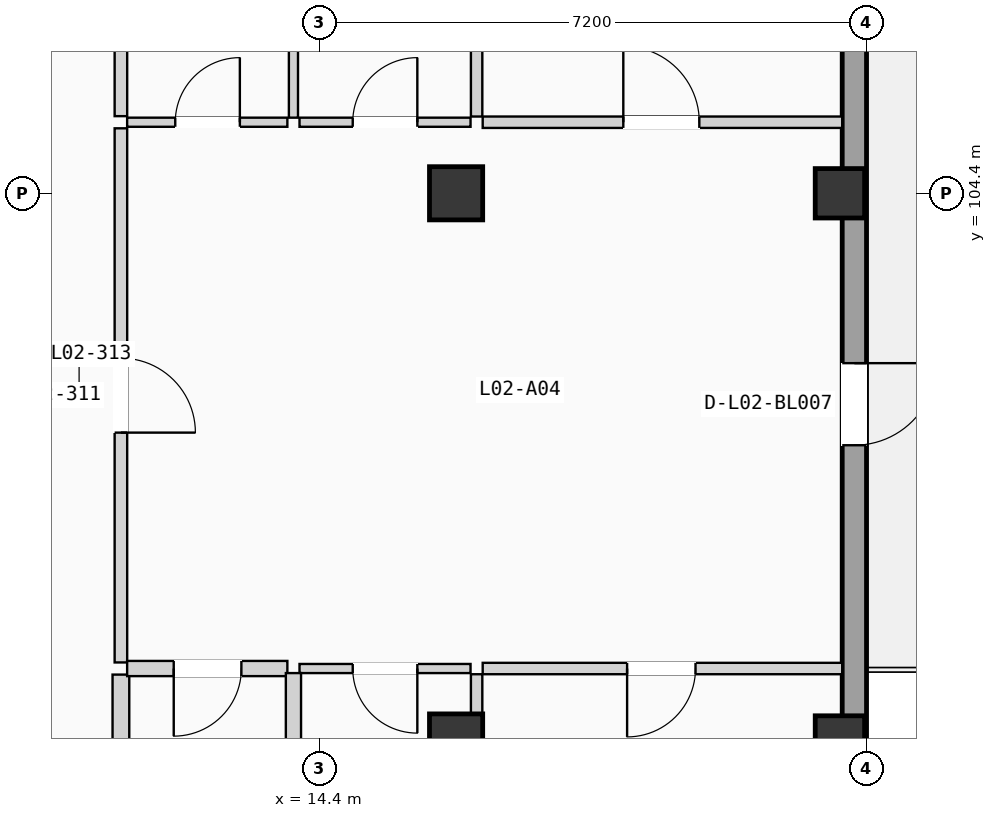
"""IFC4 building model, lengths in metres.
Left out: names, types, materials, properties, quantities, classifications, styles, units other than length and angle.
Written with IfcOpenShell. Run it as: python <this file> out.ifc"""

import sys

from ifc_helpers import new_model, si_unit, direction, frame, frame_2d, origin, origin_2d, place, context, subcontext, project, spatial, rectangle, extrude, element, fill, save


model = new_model("IFC4")
c1 = context("Model", 3, precision=1e-05, world=origin(), true_north=direction((0.0, 1.0)))
c2 = subcontext(c1, "Body", "Model", "MODEL_VIEW")
j1 = project(units=[si_unit("LENGTHUNIT", "METRE"), si_unit("PLANEANGLEUNIT", "RADIAN")], contexts=[c1])
p1 = place(None, origin())
s1 = spatial("IfcSite", under=j1, at=p1, CompositionType="ELEMENT")
p2 = place(p1, origin())
s2 = spatial("IfcBuilding", under=s1, at=p2, CompositionType="ELEMENT")
p3 = place(p2, frame((0.0, 0.0, 8.575)))
s3 = spatial("IfcBuildingStorey", under=s2, at=p3, CompositionType="ELEMENT", Elevation=8.575)
for number, where, z_axis, x_axis in (
    (1, (16.2, 97.2, 0.0), (0.0, 0.0, 1.0), (1.0, 0.0, 0.0)),
    (2, (16.2, 104.4, 0.0), (0.0, 0.0, 1.0), (1.0, 0.0, 0.0)),
):
    element("IfcColumn", number, at=place(p3, frame(where, z_axis=z_axis, x_axis=x_axis)), inside=s3, PredefinedType="COLUMN", context=c2, shape_type="SweptSolid", body=[
        extrude(rectangle(XDim=0.7, YDim=0.7, at=origin_2d()), origin(), (0.0, 0.0, 1.0), 3.5),
    ])
for number, where, z_axis, x_axis in (
    (3, (21.25, 97.2, 0.0), (0.0, 0.0, 1.0), (1.0, 0.0, 0.0)),
    (4, (21.25, 104.4, 0.0), (0.0, 0.0, 1.0), (1.0, 0.0, 0.0)),
):
    element("IfcColumn", number, at=place(p3, frame(where, z_axis=z_axis, x_axis=x_axis)), inside=s3, PredefinedType="COLUMN", context=c2, shape_type="SweptSolid", body=[
        extrude(rectangle(XDim=0.65, YDim=0.65, at=origin_2d()), origin(), (0.0, 0.0, 1.0), 3.5),
    ])
p4 = place(p3, frame((21.44, 68.72, 0.0), z_axis=(0.0, 0.0, 1.0), x_axis=(0.0, 1.0, 0.0)))
e5 = element("IfcWall", 5, at=p4, inside=s3, PredefinedType="SOLIDWALL", context=c2, shape_type="SweptSolid", body=[
    extrude(rectangle(XDim=49.76, YDim=0.32, at=frame_2d((24.88, 0.0))), origin(), (0.0, 0.0, 1.0), 3.24),
])
p5 = place(p4, frame((16.27, 0.0, 0.0)))
e6 = element("IfcOpeningElement", 6, at=p5, cuts=e5, PredefinedType="OPENING", context=c2, shape_type="SweptSolid", body=[
    extrude(rectangle(XDim=0.95, YDim=2.15, at=frame_2d((0.475, 1.075))), frame((0.0, 0.17, 0.0), z_axis=(0.0, -1.0, 0.0), x_axis=(1.0, 0.0, 0.0)), (0.0, 0.0, 1.0), 0.34),
])
p6 = place(p4, frame((8.996, 0.0, 0.9)))
e7 = element("IfcOpeningElement", 7, at=p6, cuts=e5, PredefinedType="OPENING", context=c2, shape_type="SweptSolid", body=[
    extrude(rectangle(XDim=1.48, YDim=1.2, at=frame_2d((0.74, 0.6))), frame((0.0, 0.17, 0.0), z_axis=(0.0, -1.0, 0.0), x_axis=(1.0, 0.0, 0.0)), (0.0, 0.0, 1.0), 0.34),
])
p7 = place(p4, frame((19.0, 0.0, 0.9)))
e8 = element("IfcOpeningElement", 8, at=p7, cuts=e5, PredefinedType="OPENING", context=c2, shape_type="SweptSolid", body=[
    extrude(rectangle(XDim=1.48, YDim=1.35, at=frame_2d((0.74, 0.675))), frame((0.0, 0.17, 0.0), z_axis=(0.0, -1.0, 0.0), x_axis=(1.0, 0.0, 0.0)), (0.0, 0.0, 1.0), 0.34),
])
p8 = place(p4, frame((32.365, 0.0, 0.0)))
e9 = element("IfcOpeningElement", 9, at=p8, cuts=e5, PredefinedType="OPENING", context=c2, shape_type="SweptSolid", body=[
    extrude(rectangle(XDim=1.08, YDim=2.18, at=frame_2d((0.54, 1.09))), frame((0.0, 0.17, 0.0), z_axis=(0.0, -1.0, 0.0), x_axis=(1.0, 0.0, 0.0)), (0.0, 0.0, 1.0), 0.34),
])
p9 = place(p4, frame((25.146, 0.0, 0.9)))
e10 = element("IfcOpeningElement", 10, at=p9, cuts=e5, PredefinedType="OPENING", context=c2, shape_type="SweptSolid", body=[
    extrude(rectangle(XDim=1.48, YDim=1.5, at=frame_2d((0.74, 0.75))), frame((0.0, 0.17, 0.0), z_axis=(0.0, -1.0, 0.0), x_axis=(1.0, 0.0, 0.0)), (0.0, 0.0, 1.0), 0.34),
])
p10 = place(p4, frame((38.848, 0.0, 0.9)))
e11 = element("IfcOpeningElement", 11, at=p10, cuts=e5, PredefinedType="OPENING", context=c2, shape_type="SweptSolid", body=[
    extrude(rectangle(XDim=1.48, YDim=1.65, at=frame_2d((0.74, 0.825))), frame((0.0, 0.17, 0.0), z_axis=(0.0, -1.0, 0.0), x_axis=(1.0, 0.0, 0.0)), (0.0, 0.0, 1.0), 0.34),
])
p11 = place(p3, frame((11.79, 98.227, 0.0), z_axis=(0.0, 0.0, 1.0), x_axis=(0.0, 1.0, 0.0)))
e12 = element("IfcWall", 12, at=p11, inside=s3, PredefinedType="PARTITIONING", context=c2, shape_type="SweptSolid", body=[
    extrude(rectangle(XDim=7.028, YDim=0.165, at=frame_2d((3.514, 0.0))), origin(), (0.0, 0.0, 1.0), 3.22),
])
p12 = place(p11, frame((3.024, 0.0, 0.0)))
e13 = element("IfcOpeningElement", 13, at=p12, cuts=e12, PredefinedType="OPENING", context=c2, shape_type="SweptSolid", body=[
    extrude(rectangle(XDim=0.98, YDim=2.08, at=frame_2d((0.49, 1.04))), frame((0.0, 0.093, 0.0), z_axis=(0.0, -1.0, 0.0), x_axis=(1.0, 0.0, 0.0)), (0.0, 0.0, 1.0), 0.185),
])
p13 = place(p3, frame((11.79, 92.282, 0.0), z_axis=(0.0, 0.0, 1.0), x_axis=(0.0, 1.0, 0.0)))
e14 = element("IfcWall", 14, at=p13, inside=s3, PredefinedType="PLUMBINGWALL", context=c2, shape_type="SweptSolid", body=[
    extrude(rectangle(XDim=5.785, YDim=0.22, at=frame_2d((2.893, 0.0))), origin(), (0.0, 0.0, 1.0), 3.22),
])
p14 = place(p3, frame((11.79, 105.415, 0.0), z_axis=(0.0, 0.0, 1.0), x_axis=(0.0, 1.0, 0.0)))
e15 = element("IfcWall", 15, at=p14, inside=s3, PredefinedType="PARTITIONING", context=c2, shape_type="SweptSolid", body=[
    extrude(rectangle(XDim=5.785, YDim=0.165, at=frame_2d((2.893, 0.0))), origin(), (0.0, 0.0, 1.0), 3.22),
])
p15 = place(p3, frame((11.872, 98.147, 0.0), z_axis=(0.0, 0.0, 1.0), x_axis=(1.0, 0.0, 0.0)))
e16 = element("IfcWall", 16, at=p15, inside=s3, PredefinedType="PLUMBINGWALL", context=c2, shape_type="SweptSolid", body=[
    extrude(rectangle(XDim=2.108, YDim=0.2, at=frame_2d((1.054, 0.0))), origin(), (0.0, 0.0, 1.0), 3.22),
])
p16 = place(p15, frame((0.613, 0.0, 0.0)))
e17 = element("IfcOpeningElement", 17, at=p16, cuts=e16, PredefinedType="OPENING", context=c2, shape_type="SweptSolid", body=[
    extrude(rectangle(XDim=0.89, YDim=2.03, at=frame_2d((0.445, 1.015))), frame((0.0, 0.11, 0.0), z_axis=(0.0, -1.0, 0.0), x_axis=(1.0, 0.0, 0.0)), (0.0, 0.0, 1.0), 0.22),
])
p17 = place(p3, frame((11.872, 105.335, 0.0), z_axis=(0.0, 0.0, 1.0), x_axis=(1.0, 0.0, 0.0)))
e18 = element("IfcWall", 18, at=p17, inside=s3, PredefinedType="PARTITIONING", context=c2, shape_type="SweptSolid", body=[
    extrude(rectangle(XDim=2.108, YDim=0.12, at=frame_2d((1.054, 0.0))), origin(), (0.0, 0.0, 1.0), 3.22),
])
p18 = place(p17, frame((0.633, 0.0, 0.0)))
e19 = element("IfcOpeningElement", 19, at=p18, cuts=e18, PredefinedType="OPENING", context=c2, shape_type="SweptSolid", body=[
    extrude(rectangle(XDim=0.85, YDim=2.01, at=frame_2d((0.425, 1.005))), frame((0.0, 0.07, 0.0), z_axis=(0.0, -1.0, 0.0), x_axis=(1.0, 0.0, 0.0)), (0.0, 0.0, 1.0), 0.14),
])
p19 = place(p3, frame((16.55, 98.147, 0.0), z_axis=(0.0, 0.0, 1.0), x_axis=(1.0, 0.0, 0.0)))
e20 = element("IfcWall", 20, at=p19, inside=s3, PredefinedType="PARTITIONING", context=c2, shape_type="SweptSolid", body=[
    extrude(rectangle(XDim=4.73, YDim=0.15, at=frame_2d((2.365, 0.0))), origin(), (0.0, 0.0, 1.0), 3.22),
])
p20 = place(p19, frame((1.9, 0.0, 0.0)))
e21 = element("IfcOpeningElement", 21, at=p20, cuts=e20, PredefinedType="OPENING", context=c2, shape_type="SweptSolid", body=[
    extrude(rectangle(XDim=0.9, YDim=2.04, at=frame_2d((0.45, 1.02))), frame((0.0, 0.085, 0.0), z_axis=(0.0, -1.0, 0.0), x_axis=(1.0, 0.0, 0.0)), (0.0, 0.0, 1.0), 0.17),
])
p21 = place(p3, frame((14.14, 98.147, 0.0), z_axis=(0.0, 0.0, 1.0), x_axis=(1.0, 0.0, 0.0)))
e22 = element("IfcWall", 22, at=p21, inside=s3, PredefinedType="PARTITIONING", context=c2, shape_type="SweptSolid", body=[
    extrude(rectangle(XDim=2.25, YDim=0.12, at=frame_2d((1.125, 0.0))), origin(), (0.0, 0.0, 1.0), 3.22),
])
p22 = place(p21, frame((0.7, 0.0, 0.0)))
e23 = element("IfcOpeningElement", 23, at=p22, cuts=e22, PredefinedType="OPENING", context=c2, shape_type="SweptSolid", body=[
    extrude(rectangle(XDim=0.85, YDim=2.01, at=frame_2d((0.425, 1.005))), frame((0.0, 0.07, 0.0), z_axis=(0.0, -1.0, 0.0), x_axis=(1.0, 0.0, 0.0)), (0.0, 0.0, 1.0), 0.14),
])
p23 = place(p3, frame((16.55, 105.335, 0.0), z_axis=(0.0, 0.0, 1.0), x_axis=(1.0, 0.0, 0.0)))
e24 = element("IfcWall", 24, at=p23, inside=s3, PredefinedType="PARTITIONING", context=c2, shape_type="SweptSolid", body=[
    extrude(rectangle(XDim=4.73, YDim=0.15, at=frame_2d((2.365, 0.0))), origin(), (0.0, 0.0, 1.0), 3.22),
])
p24 = place(p23, frame((1.85, 0.0, 0.0)))
e25 = element("IfcOpeningElement", 25, at=p24, cuts=e24, PredefinedType="OPENING", context=c2, shape_type="SweptSolid", body=[
    extrude(rectangle(XDim=1.0, YDim=2.06, at=frame_2d((0.5, 1.03))), frame((0.0, 0.085, 0.0), z_axis=(0.0, -1.0, 0.0), x_axis=(1.0, 0.0, 0.0)), (0.0, 0.0, 1.0), 0.17),
])
p25 = place(p3, frame((14.14, 105.335, 0.0), z_axis=(0.0, 0.0, 1.0), x_axis=(1.0, 0.0, 0.0)))
e26 = element("IfcWall", 26, at=p25, inside=s3, PredefinedType="PARTITIONING", context=c2, shape_type="SweptSolid", body=[
    extrude(rectangle(XDim=2.25, YDim=0.12, at=frame_2d((1.125, 0.0))), origin(), (0.0, 0.0, 1.0), 3.22),
])
p26 = place(p25, frame((0.7, 0.0, 0.0)))
e27 = element("IfcOpeningElement", 27, at=p26, cuts=e26, PredefinedType="OPENING", context=c2, shape_type="SweptSolid", body=[
    extrude(rectangle(XDim=0.85, YDim=2.01, at=frame_2d((0.425, 1.005))), frame((0.0, 0.07, 0.0), z_axis=(0.0, -1.0, 0.0), x_axis=(1.0, 0.0, 0.0)), (0.0, 0.0, 1.0), 0.14),
])
p27 = place(p3, frame((14.06, 92.282, 0.0), z_axis=(0.0, 0.0, 1.0), x_axis=(0.0, 1.0, 0.0)))
e28 = element("IfcWall", 28, at=p27, inside=s3, PredefinedType="PLUMBINGWALL", context=c2, shape_type="SweptSolid", body=[
    extrude(rectangle(XDim=5.805, YDim=0.2, at=frame_2d((2.902, 0.0))), origin(), (0.0, 0.0, 1.0), 3.22),
])
p28 = place(p27, frame((2.467, 0.0, 0.0)))
e29 = element("IfcOpeningElement", 29, at=p28, cuts=e28, PredefinedType="OPENING", context=c2, shape_type="SweptSolid", body=[
    extrude(rectangle(XDim=0.85, YDim=2.01, at=frame_2d((0.425, 1.005))), frame((0.0, 0.11, 0.0), z_axis=(0.0, -1.0, 0.0), x_axis=(1.0, 0.0, 0.0)), (0.0, 0.0, 1.0), 0.22),
])
p29 = place(p3, frame((14.06, 105.395, 0.0), z_axis=(0.0, 0.0, 1.0), x_axis=(0.0, 1.0, 0.0)))
e30 = element("IfcWall", 30, at=p29, inside=s3, PredefinedType="PARTITIONING", context=c2, shape_type="SweptSolid", body=[
    extrude(rectangle(XDim=5.805, YDim=0.12, at=frame_2d((2.902, 0.0))), origin(), (0.0, 0.0, 1.0), 3.22),
])
for number, where, z_axis, x_axis in (
    (31, (16.47, 92.282, 0.0), (0.0, 0.0, 1.0), (0.0, 1.0, 0.0)),
    (32, (16.47, 105.41, 0.0), (0.0, 0.0, 1.0), (0.0, 1.0, 0.0)),
):
    element("IfcWall", number, at=place(p3, frame(where, z_axis=z_axis, x_axis=x_axis)), inside=s3, PredefinedType="PARTITIONING", context=c2, shape_type="SweptSolid", body=[
        extrude(rectangle(XDim=5.79, YDim=0.15, at=frame_2d((2.895, 0.0))), origin(), (0.0, 0.0, 1.0), 3.22),
    ])
p30 = place(p8, frame((1.08, 0.0, 0.0), z_axis=(0.0, 0.0, 1.0), x_axis=(-1.0, 0.0, 0.0)))
e33 = element("IfcDoor", 33, at=p30, inside=s3, OperationType="SINGLE_SWING_RIGHT", PredefinedType="DOOR", context=c2, shape_type="SweptSolid", body=[
    extrude(rectangle(XDim=1.08, YDim=2.18, at=frame_2d((0.54, 1.09))), frame((0.0, 0.025, 0.0), z_axis=(0.0, -1.0, 0.0), x_axis=(1.0, 0.0, 0.0)), (0.0, 0.0, 1.0), 0.05),
])
fill(e9, e33)
p31 = place(p12, frame((0.98, 0.0, 0.0), z_axis=(0.0, 0.0, 1.0), x_axis=(-1.0, 0.0, 0.0)))
e34 = element("IfcDoor", 34, at=p31, inside=s3, OperationType="SINGLE_SWING_LEFT", PredefinedType="DOOR", context=c2, shape_type="SweptSolid", body=[
    extrude(rectangle(XDim=0.98, YDim=2.08, at=frame_2d((0.49, 1.04))), frame((0.0, 0.025, 0.0), z_axis=(0.0, -1.0, 0.0), x_axis=(1.0, 0.0, 0.0)), (0.0, 0.0, 1.0), 0.05),
])
fill(e13, e34)
p32 = place(p16, frame((0.89, 0.0, 0.0), z_axis=(0.0, 0.0, 1.0), x_axis=(-1.0, 0.0, 0.0)))
e35 = element("IfcDoor", 35, at=p32, inside=s3, OperationType="SINGLE_SWING_LEFT", PredefinedType="DOOR", context=c2, shape_type="SweptSolid", body=[
    extrude(rectangle(XDim=0.89, YDim=2.03, at=frame_2d((0.445, 1.015))), frame((0.0, 0.025, 0.0), z_axis=(0.0, -1.0, 0.0), x_axis=(1.0, 0.0, 0.0)), (0.0, 0.0, 1.0), 0.05),
])
fill(e17, e35)
p33 = place(p18, origin())
e36 = element("IfcDoor", 36, at=p33, inside=s3, OperationType="SINGLE_SWING_RIGHT", PredefinedType="DOOR", context=c2, shape_type="SweptSolid", body=[
    extrude(rectangle(XDim=0.85, YDim=2.01, at=frame_2d((0.425, 1.005))), frame((0.0, 0.025, 0.0), z_axis=(0.0, -1.0, 0.0), x_axis=(1.0, 0.0, 0.0)), (0.0, 0.0, 1.0), 0.05),
])
fill(e19, e36)
p34 = place(p20, frame((0.9, 0.0, 0.0), z_axis=(0.0, 0.0, 1.0), x_axis=(-1.0, 0.0, 0.0)))
e37 = element("IfcDoor", 37, at=p34, inside=s3, OperationType="SINGLE_SWING_LEFT", PredefinedType="DOOR", context=c2, shape_type="SweptSolid", body=[
    extrude(rectangle(XDim=0.9, YDim=2.04, at=frame_2d((0.45, 1.02))), frame((0.0, 0.025, 0.0), z_axis=(0.0, -1.0, 0.0), x_axis=(1.0, 0.0, 0.0)), (0.0, 0.0, 1.0), 0.05),
])
fill(e21, e37)
p35 = place(p22, frame((0.85, 0.0, 0.0), z_axis=(0.0, 0.0, 1.0), x_axis=(-1.0, 0.0, 0.0)))
e38 = element("IfcDoor", 38, at=p35, inside=s3, OperationType="SINGLE_SWING_RIGHT", PredefinedType="DOOR", context=c2, shape_type="SweptSolid", body=[
    extrude(rectangle(XDim=0.85, YDim=2.01, at=frame_2d((0.425, 1.005))), frame((0.0, 0.025, 0.0), z_axis=(0.0, -1.0, 0.0), x_axis=(1.0, 0.0, 0.0)), (0.0, 0.0, 1.0), 0.05),
])
fill(e23, e38)
p36 = place(p24, origin())
e39 = element("IfcDoor", 39, at=p36, inside=s3, OperationType="SINGLE_SWING_LEFT", PredefinedType="DOOR", context=c2, shape_type="SweptSolid", body=[
    extrude(rectangle(XDim=1.0, YDim=2.06, at=frame_2d((0.5, 1.03))), frame((0.0, 0.025, 0.0), z_axis=(0.0, -1.0, 0.0), x_axis=(1.0, 0.0, 0.0)), (0.0, 0.0, 1.0), 0.05),
])
fill(e25, e39)
p37 = place(p26, origin())
e40 = element("IfcDoor", 40, at=p37, inside=s3, OperationType="SINGLE_SWING_RIGHT", PredefinedType="DOOR", context=c2, shape_type="SweptSolid", body=[
    extrude(rectangle(XDim=0.85, YDim=2.01, at=frame_2d((0.425, 1.005))), frame((0.0, 0.025, 0.0), z_axis=(0.0, -1.0, 0.0), x_axis=(1.0, 0.0, 0.0)), (0.0, 0.0, 1.0), 0.05),
])
fill(e27, e40)
save(model, sys.argv[1])
